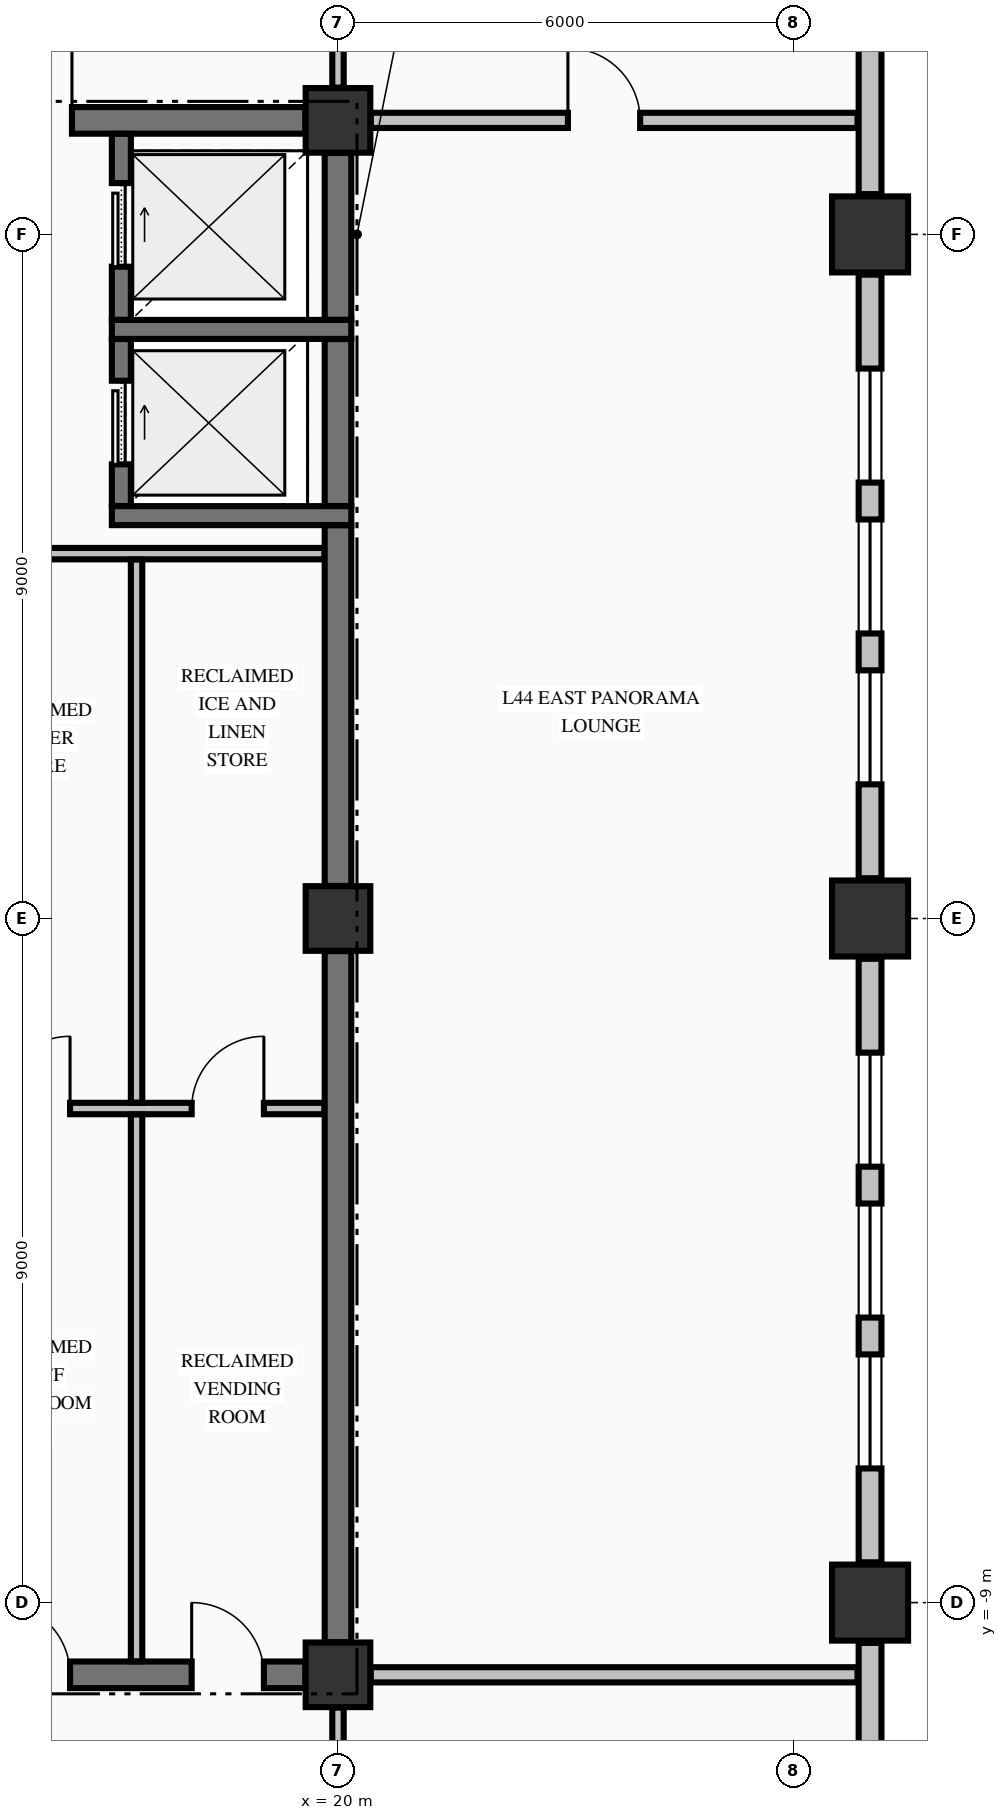
"""IFC4 building model, lengths in metres.
Left out: names, types, materials, properties, quantities, classifications, styles, units other than length and angle.
Written with IfcOpenShell. Run it as: python <this file> out.ifc"""

import sys

from ifc_helpers import new_model, si_unit, direction, frame, frame_2d, origin, origin_2d, place, context, subcontext, project, spatial, rectangle, extrude, element, fill, save


model = new_model("IFC4")
c1 = context("Model", 3, precision=1e-05, world=origin(), true_north=direction((0.0, 1.0)))
c2 = subcontext(c1, "Body", "Model", "MODEL_VIEW")
j1 = project(units=[si_unit("LENGTHUNIT", "METRE"), si_unit("PLANEANGLEUNIT", "RADIAN")], contexts=[c1])
p1 = place(None, origin())
s1 = spatial("IfcSite", under=j1, at=p1, CompositionType="ELEMENT")
p2 = place(p1, origin())
s2 = spatial("IfcBuilding", under=s1, at=p2, CompositionType="ELEMENT")
p3 = place(p2, frame((0.0, 0.0, 172.86)))
s3 = spatial("IfcBuildingStorey", under=s2, at=p3, CompositionType="ELEMENT", Elevation=172.86)
for number, where, z_axis, x_axis in (
    (1, (27.0, -9.0, -0.25), (0.0, 0.0, 1.0), (1.0, 0.0, 0.0)),
    (2, (27.0, 0.0, -0.25), (0.0, 0.0, 1.0), (1.0, 0.0, 0.0)),
    (3, (27.0, 9.0, -0.25), (0.0, 0.0, 1.0), (1.0, 0.0, 0.0)),
):
    element("IfcColumn", number, at=place(p3, frame(where, z_axis=z_axis, x_axis=x_axis)), inside=s3, PredefinedType="COLUMN", context=c2, shape_type="SweptSolid", body=[
        extrude(rectangle(XDim=1.0, YDim=1.0, at=origin_2d()), origin(), (0.0, 0.0, 1.0), 3.375),
    ])
for number, where, z_axis, x_axis in (
    (4, (20.0, -9.95, -0.25), (0.0, 0.0, 1.0), (1.0, 0.0, 0.0)),
    (5, (20.0, 10.5, -0.25), (0.0, 0.0, 1.0), (1.0, 0.0, 0.0)),
    (6, (20.0, 0.0, -0.25), (0.0, 0.0, 1.0), (1.0, 0.0, 0.0)),
):
    element("IfcColumn", number, at=place(p3, frame(where, z_axis=z_axis, x_axis=x_axis)), inside=s3, PredefinedType="COLUMN", context=c2, shape_type="SweptSolid", body=[
        extrude(rectangle(XDim=0.85, YDim=0.85, at=origin_2d()), origin(), (0.0, 0.0, 1.0), 3.375),
    ])
p4 = place(p3, frame((27.0, -18.97, 0.0), z_axis=(0.0, 0.0, 1.0), x_axis=(0.0, 1.0, 0.0)))
e7 = element("IfcWall", 7, at=p4, inside=s3, PredefinedType="STANDARD", context=c2, shape_type="SweptSolid", body=[
    extrude(rectangle(XDim=9.44, YDim=0.3, at=frame_2d((4.72, 0.0))), origin(), (0.0, 0.0, 1.0), 2.517),
])
p5 = place(p3, frame((27.0, -8.47, 0.0), z_axis=(0.0, 0.0, 1.0), x_axis=(0.0, 1.0, 0.0)))
e8 = element("IfcWall", 8, at=p5, inside=s3, PredefinedType="STANDARD", context=c2, shape_type="SweptSolid", body=[
    extrude(rectangle(XDim=7.94, YDim=0.3, at=frame_2d((3.97, 0.0))), origin(), (0.0, 0.0, 1.0), 2.517),
])
p6 = place(p5, frame((1.235, 0.0, 0.72)))
e9 = element("IfcOpeningElement", 9, at=p6, cuts=e8, PredefinedType="OPENING", context=c2, shape_type="SweptSolid", body=[
    extrude(rectangle(XDim=1.5, YDim=1.6, at=frame_2d((0.75, 0.8))), frame((0.0, 0.16, 0.0), z_axis=(0.0, -1.0, 0.0), x_axis=(1.0, 0.0, 0.0)), (0.0, 0.0, 1.0), 0.32),
])
p7 = place(p5, frame((3.22, 0.0, 0.72)))
e10 = element("IfcOpeningElement", 10, at=p7, cuts=e8, PredefinedType="OPENING", context=c2, shape_type="SweptSolid", body=[
    extrude(rectangle(XDim=1.5, YDim=1.6, at=frame_2d((0.75, 0.8))), frame((0.0, 0.16, 0.0), z_axis=(0.0, -1.0, 0.0), x_axis=(1.0, 0.0, 0.0)), (0.0, 0.0, 1.0), 0.32),
])
p8 = place(p5, frame((5.205, 0.0, 0.72)))
e11 = element("IfcOpeningElement", 11, at=p8, cuts=e8, PredefinedType="OPENING", context=c2, shape_type="SweptSolid", body=[
    extrude(rectangle(XDim=1.5, YDim=1.6, at=frame_2d((0.75, 0.8))), frame((0.0, 0.16, 0.0), z_axis=(0.0, -1.0, 0.0), x_axis=(1.0, 0.0, 0.0)), (0.0, 0.0, 1.0), 0.32),
])
p9 = place(p3, frame((27.0, 0.53, 0.0), z_axis=(0.0, 0.0, 1.0), x_axis=(0.0, 1.0, 0.0)))
e12 = element("IfcWall", 12, at=p9, inside=s3, PredefinedType="STANDARD", context=c2, shape_type="SweptSolid", body=[
    extrude(rectangle(XDim=7.94, YDim=0.3, at=frame_2d((3.97, 0.0))), origin(), (0.0, 0.0, 1.0), 2.517),
])
p10 = place(p9, frame((1.235, 0.0, 0.72)))
e13 = element("IfcOpeningElement", 13, at=p10, cuts=e12, PredefinedType="OPENING", context=c2, shape_type="SweptSolid", body=[
    extrude(rectangle(XDim=1.5, YDim=1.6, at=frame_2d((0.75, 0.8))), frame((0.0, 0.16, 0.0), z_axis=(0.0, -1.0, 0.0), x_axis=(1.0, 0.0, 0.0)), (0.0, 0.0, 1.0), 0.32),
])
p11 = place(p9, frame((3.22, 0.0, 0.72)))
e14 = element("IfcOpeningElement", 14, at=p11, cuts=e12, PredefinedType="OPENING", context=c2, shape_type="SweptSolid", body=[
    extrude(rectangle(XDim=1.5, YDim=1.6, at=frame_2d((0.75, 0.8))), frame((0.0, 0.16, 0.0), z_axis=(0.0, -1.0, 0.0), x_axis=(1.0, 0.0, 0.0)), (0.0, 0.0, 1.0), 0.32),
])
p12 = place(p9, frame((5.205, 0.0, 0.72)))
e15 = element("IfcOpeningElement", 15, at=p12, cuts=e12, PredefinedType="OPENING", context=c2, shape_type="SweptSolid", body=[
    extrude(rectangle(XDim=1.5, YDim=1.6, at=frame_2d((0.75, 0.8))), frame((0.0, 0.16, 0.0), z_axis=(0.0, -1.0, 0.0), x_axis=(1.0, 0.0, 0.0)), (0.0, 0.0, 1.0), 0.32),
])
p13 = place(p3, frame((27.0, 9.53, 0.0), z_axis=(0.0, 0.0, 1.0), x_axis=(0.0, 1.0, 0.0)))
e16 = element("IfcWall", 16, at=p13, inside=s3, PredefinedType="STANDARD", context=c2, shape_type="SweptSolid", body=[
    extrude(rectangle(XDim=9.44, YDim=0.3, at=frame_2d((4.72, 0.0))), origin(), (0.0, 0.0, 1.0), 2.517),
])
p14 = place(p3, frame((14.7, -9.95, 0.0), z_axis=(0.0, 0.0, 1.0), x_axis=(1.0, 0.0, 0.0)))
e17 = element("IfcWall", 17, at=p14, inside=s3, PredefinedType="SHEAR", context=c2, shape_type="SweptSolid", body=[
    extrude(rectangle(XDim=4.871, YDim=0.35, at=frame_2d((2.436, 0.0))), origin(), (0.0, 0.0, 1.0), 3.125),
])
p15 = place(p14, frame((0.825, 0.0, 0.0)))
e18 = element("IfcOpeningElement", 18, at=p15, cuts=e17, PredefinedType="OPENING", context=c2, shape_type="SweptSolid", body=[
    extrude(rectangle(XDim=0.95, YDim=2.15, at=frame_2d((0.475, 1.075))), frame((0.0, 0.185, 0.0), z_axis=(0.0, -1.0, 0.0), x_axis=(1.0, 0.0, 0.0)), (0.0, 0.0, 1.0), 0.37),
])
p16 = place(p14, frame((3.375, 0.0, 0.0)))
e19 = element("IfcOpeningElement", 19, at=p16, cuts=e17, PredefinedType="OPENING", context=c2, shape_type="SweptSolid", body=[
    extrude(rectangle(XDim=0.95, YDim=2.15, at=frame_2d((0.475, 1.075))), frame((0.0, 0.185, 0.0), z_axis=(0.0, -1.0, 0.0), x_axis=(1.0, 0.0, 0.0)), (0.0, 0.0, 1.0), 0.37),
])
for number, where, z_axis, x_axis in (
    (20, (17.025, 5.3, 0.0), (0.0, 0.0, 1.0), (1.0, 0.0, 0.0)),
    (21, (17.025, 7.75, 0.0), (0.0, 0.0, 1.0), (1.0, 0.0, 0.0)),
):
    element("IfcWall", number, at=place(p3, frame(where, z_axis=z_axis, x_axis=x_axis)), inside=s3, PredefinedType="SOLIDWALL", context=c2, shape_type="SweptSolid", body=[
        extrude(rectangle(XDim=3.15, YDim=0.25, at=frame_2d((1.575, 0.0))), origin(), (0.0, 0.0, 1.0), 3.125),
    ])
p17 = place(p3, frame((14.7, 10.5, 0.0), z_axis=(0.0, 0.0, 1.0), x_axis=(1.0, 0.0, 0.0)))
e22 = element("IfcWall", 22, at=p17, inside=s3, PredefinedType="SHEAR", context=c2, shape_type="SweptSolid", body=[
    extrude(rectangle(XDim=4.871, YDim=0.35, at=frame_2d((2.436, 0.0))), origin(), (0.0, 0.0, 1.0), 3.125),
])
p18 = place(p17, frame((0.7, 0.0, 0.0)))
e23 = element("IfcOpeningElement", 23, at=p18, cuts=e22, PredefinedType="OPENING", context=c2, shape_type="SweptSolid", body=[
    extrude(rectangle(XDim=1.1, YDim=2.15, at=frame_2d((0.55, 1.075))), frame((0.0, 0.185, 0.0), z_axis=(0.0, -1.0, 0.0), x_axis=(1.0, 0.0, 0.0)), (0.0, 0.0, 1.0), 0.37),
])
p19 = place(p3, frame((20.431, -9.95, 0.0), z_axis=(0.0, 0.0, 1.0), x_axis=(1.0, 0.0, 0.0)))
e24 = element("IfcWall", 24, at=p19, inside=s3, PredefinedType="PARTITIONING", context=c2, shape_type="SweptSolid", body=[
    extrude(rectangle(XDim=6.404, YDim=0.2, at=frame_2d((3.202, 0.0))), origin(), (0.0, 0.0, 1.0), 3.125),
])
p20 = place(p3, frame((14.878, -2.5, 0.0), z_axis=(0.0, 0.0, 1.0), x_axis=(1.0, 0.0, 0.0)))
e25 = element("IfcWall", 25, at=p20, inside=s3, PredefinedType="PARTITIONING", context=c2, shape_type="SweptSolid", body=[
    extrude(rectangle(XDim=4.944, YDim=0.15, at=frame_2d((2.472, 0.0))), origin(), (0.0, 0.0, 1.0), 3.125),
])
p21 = place(p20, frame((0.647, 0.0, 0.0)))
e26 = element("IfcOpeningElement", 26, at=p21, cuts=e25, PredefinedType="OPENING", context=c2, shape_type="SweptSolid", body=[
    extrude(rectangle(XDim=0.95, YDim=2.15, at=frame_2d((0.475, 1.075))), frame((0.0, 0.085, 0.0), z_axis=(0.0, -1.0, 0.0), x_axis=(1.0, 0.0, 0.0)), (0.0, 0.0, 1.0), 0.17),
])
p22 = place(p20, frame((3.197, 0.0, 0.0)))
e27 = element("IfcOpeningElement", 27, at=p22, cuts=e25, PredefinedType="OPENING", context=c2, shape_type="SweptSolid", body=[
    extrude(rectangle(XDim=0.95, YDim=2.15, at=frame_2d((0.475, 1.075))), frame((0.0, 0.085, 0.0), z_axis=(0.0, -1.0, 0.0), x_axis=(1.0, 0.0, 0.0)), (0.0, 0.0, 1.0), 0.17),
])
p23 = place(p3, frame((14.878, 4.8, 0.0), z_axis=(0.0, 0.0, 1.0), x_axis=(1.0, 0.0, 0.0)))
e28 = element("IfcWall", 28, at=p23, inside=s3, PredefinedType="PARTITIONING", context=c2, shape_type="SweptSolid", body=[
    extrude(rectangle(XDim=4.944, YDim=0.15, at=frame_2d((2.472, 0.0))), origin(), (0.0, 0.0, 1.0), 3.125),
])
p24 = place(p3, frame((20.431, 10.5, 0.0), z_axis=(0.0, 0.0, 1.0), x_axis=(1.0, 0.0, 0.0)))
e29 = element("IfcWall", 29, at=p24, inside=s3, PredefinedType="PARTITIONING", context=c2, shape_type="SweptSolid", body=[
    extrude(rectangle(XDim=6.404, YDim=0.2, at=frame_2d((3.202, 0.0))), origin(), (0.0, 0.0, 1.0), 3.125),
])
p25 = place(p24, frame((2.594, 0.0, 0.0)))
e30 = element("IfcOpeningElement", 30, at=p25, cuts=e29, PredefinedType="OPENING", context=c2, shape_type="SweptSolid", body=[
    extrude(rectangle(XDim=0.95, YDim=2.15, at=frame_2d((0.475, 1.075))), frame((0.0, 0.11, 0.0), z_axis=(0.0, -1.0, 0.0), x_axis=(1.0, 0.0, 0.0)), (0.0, 0.0, 1.0), 0.22),
])
p26 = place(p3, frame((17.15, 5.427, 0.0), z_axis=(0.0, 0.0, 1.0), x_axis=(0.0, 1.0, 0.0)))
e31 = element("IfcWall", 31, at=p26, inside=s3, PredefinedType="SOLIDWALL", context=c2, shape_type="SweptSolid", body=[
    extrude(rectangle(XDim=2.196, YDim=0.25, at=frame_2d((1.098, 0.0))), origin(), (0.0, 0.0, 1.0), 3.125),
])
p27 = place(p26, frame((0.548, 0.0, 0.0)))
e32 = element("IfcOpeningElement", 32, at=p27, cuts=e31, PredefinedType="OPENING", context=c2, shape_type="SweptSolid", body=[
    extrude(rectangle(XDim=1.1, YDim=2.2, at=frame_2d((0.55, 1.1))), frame((0.0, 0.135, 0.0), z_axis=(0.0, -1.0, 0.0), x_axis=(1.0, 0.0, 0.0)), (0.0, 0.0, 1.0), 0.27),
])
p28 = place(p3, frame((17.15, 7.877, 0.0), z_axis=(0.0, 0.0, 1.0), x_axis=(0.0, 1.0, 0.0)))
e33 = element("IfcWall", 33, at=p28, inside=s3, PredefinedType="SOLIDWALL", context=c2, shape_type="SweptSolid", body=[
    extrude(rectangle(XDim=2.446, YDim=0.25, at=frame_2d((1.223, 0.0))), origin(), (0.0, 0.0, 1.0), 3.125),
])
p29 = place(p28, frame((0.698, 0.0, 0.0)))
e34 = element("IfcOpeningElement", 34, at=p29, cuts=e33, PredefinedType="OPENING", context=c2, shape_type="SweptSolid", body=[
    extrude(rectangle(XDim=1.1, YDim=2.2, at=frame_2d((0.55, 1.1))), frame((0.0, 0.135, 0.0), z_axis=(0.0, -1.0, 0.0), x_axis=(1.0, 0.0, 0.0)), (0.0, 0.0, 1.0), 0.27),
])
p30 = place(p3, frame((20.0, -9.521, 0.0), z_axis=(0.0, 0.0, 1.0), x_axis=(0.0, 1.0, 0.0)))
e35 = element("IfcWall", 35, at=p30, inside=s3, PredefinedType="SHEAR", context=c2, shape_type="SweptSolid", body=[
    extrude(rectangle(XDim=9.092, YDim=0.35, at=frame_2d((4.546, 0.0))), origin(), (0.0, 0.0, 1.0), 3.125),
])
p31 = place(p3, frame((20.0, 0.429, 0.0), z_axis=(0.0, 0.0, 1.0), x_axis=(0.0, 1.0, 0.0)))
e36 = element("IfcWall", 36, at=p31, inside=s3, PredefinedType="SHEAR", context=c2, shape_type="SweptSolid", body=[
    extrude(rectangle(XDim=4.744, YDim=0.35, at=frame_2d((2.372, 0.0))), origin(), (0.0, 0.0, 1.0), 3.125),
])
p32 = place(p3, frame((20.0, 5.427, 0.0), z_axis=(0.0, 0.0, 1.0), x_axis=(0.0, 1.0, 0.0)))
e37 = element("IfcWall", 37, at=p32, inside=s3, PredefinedType="SHEAR", context=c2, shape_type="SweptSolid", body=[
    extrude(rectangle(XDim=2.196, YDim=0.35, at=frame_2d((1.098, 0.0))), origin(), (0.0, 0.0, 1.0), 3.125),
])
p33 = place(p3, frame((20.0, 7.877, 0.0), z_axis=(0.0, 0.0, 1.0), x_axis=(0.0, 1.0, 0.0)))
e38 = element("IfcWall", 38, at=p33, inside=s3, PredefinedType="SHEAR", context=c2, shape_type="SweptSolid", body=[
    extrude(rectangle(XDim=2.194, YDim=0.35, at=frame_2d((1.097, 0.0))), origin(), (0.0, 0.0, 1.0), 3.125),
])
p34 = place(p3, frame((17.35, -9.772, 0.0), z_axis=(0.0, 0.0, 1.0), x_axis=(0.0, 1.0, 0.0)))
e39 = element("IfcWall", 39, at=p34, inside=s3, PredefinedType="PARTITIONING", context=c2, shape_type="SweptSolid", body=[
    extrude(rectangle(XDim=7.194, YDim=0.15, at=frame_2d((3.597, 0.0))), origin(), (0.0, 0.0, 1.0), 3.125),
])
p35 = place(p3, frame((17.35, -2.422, 0.0), z_axis=(0.0, 0.0, 1.0), x_axis=(0.0, 1.0, 0.0)))
e40 = element("IfcWall", 40, at=p35, inside=s3, PredefinedType="PARTITIONING", context=c2, shape_type="SweptSolid", body=[
    extrude(rectangle(XDim=7.144, YDim=0.15, at=frame_2d((3.572, 0.0))), origin(), (0.0, 0.0, 1.0), 3.125),
])
p36 = place(p3, frame((20.0, -12.097, 0.0), z_axis=(0.0, 0.0, 1.0), x_axis=(0.0, 1.0, 0.0)))
e41 = element("IfcWall", 41, at=p36, inside=s3, PredefinedType="PARTITIONING", context=c2, shape_type="SweptSolid", body=[
    extrude(rectangle(XDim=1.716, YDim=0.15, at=frame_2d((0.858, 0.0))), origin(), (0.0, 0.0, 1.0), 2.317),
])
p37 = place(p3, frame((20.0, 10.931, 0.0), z_axis=(0.0, 0.0, 1.0), x_axis=(0.0, 1.0, 0.0)))
e42 = element("IfcWall", 42, at=p37, inside=s3, PredefinedType="PARTITIONING", context=c2, shape_type="SweptSolid", body=[
    extrude(rectangle(XDim=2.516, YDim=0.15, at=frame_2d((1.258, 0.0))), origin(), (0.0, 0.0, 1.0), 2.317),
])
p38 = place(p37, frame((0.624, 0.0, 0.0)))
e43 = element("IfcOpeningElement", 43, at=p38, cuts=e42, PredefinedType="OPENING", context=c2, shape_type="SweptSolid", body=[
    extrude(rectangle(XDim=0.95, YDim=2.15, at=frame_2d((0.475, 1.075))), frame((0.0, 0.085, 0.0), z_axis=(0.0, -1.0, 0.0), x_axis=(1.0, 0.0, 0.0)), (0.0, 0.0, 1.0), 0.17),
])
p39 = place(p6, origin())
e44 = element("IfcWindow", 44, at=p39, inside=s3, PartitioningType="SINGLE_PANEL", PredefinedType="WINDOW", context=c2, shape_type="SweptSolid", body=[
    extrude(rectangle(XDim=1.5, YDim=1.6, at=frame_2d((0.75, 0.8))), frame((0.0, 0.03, 0.0), z_axis=(0.0, -1.0, 0.0), x_axis=(1.0, 0.0, 0.0)), (0.0, 0.0, 1.0), 0.06),
])
fill(e9, e44)
p40 = place(p7, origin())
e45 = element("IfcWindow", 45, at=p40, inside=s3, PartitioningType="SINGLE_PANEL", PredefinedType="WINDOW", context=c2, shape_type="SweptSolid", body=[
    extrude(rectangle(XDim=1.5, YDim=1.6, at=frame_2d((0.75, 0.8))), frame((0.0, 0.03, 0.0), z_axis=(0.0, -1.0, 0.0), x_axis=(1.0, 0.0, 0.0)), (0.0, 0.0, 1.0), 0.06),
])
fill(e10, e45)
p41 = place(p8, origin())
e46 = element("IfcWindow", 46, at=p41, inside=s3, PartitioningType="SINGLE_PANEL", PredefinedType="WINDOW", context=c2, shape_type="SweptSolid", body=[
    extrude(rectangle(XDim=1.5, YDim=1.6, at=frame_2d((0.75, 0.8))), frame((0.0, 0.03, 0.0), z_axis=(0.0, -1.0, 0.0), x_axis=(1.0, 0.0, 0.0)), (0.0, 0.0, 1.0), 0.06),
])
fill(e11, e46)
p42 = place(p10, origin())
e47 = element("IfcWindow", 47, at=p42, inside=s3, PartitioningType="SINGLE_PANEL", PredefinedType="WINDOW", context=c2, shape_type="SweptSolid", body=[
    extrude(rectangle(XDim=1.5, YDim=1.6, at=frame_2d((0.75, 0.8))), frame((0.0, 0.03, 0.0), z_axis=(0.0, -1.0, 0.0), x_axis=(1.0, 0.0, 0.0)), (0.0, 0.0, 1.0), 0.06),
])
fill(e13, e47)
p43 = place(p11, origin())
e48 = element("IfcWindow", 48, at=p43, inside=s3, PartitioningType="SINGLE_PANEL", PredefinedType="WINDOW", context=c2, shape_type="SweptSolid", body=[
    extrude(rectangle(XDim=1.5, YDim=1.6, at=frame_2d((0.75, 0.8))), frame((0.0, 0.03, 0.0), z_axis=(0.0, -1.0, 0.0), x_axis=(1.0, 0.0, 0.0)), (0.0, 0.0, 1.0), 0.06),
])
fill(e14, e48)
p44 = place(p12, origin())
e49 = element("IfcWindow", 49, at=p44, inside=s3, PartitioningType="SINGLE_PANEL", PredefinedType="WINDOW", context=c2, shape_type="SweptSolid", body=[
    extrude(rectangle(XDim=1.5, YDim=1.6, at=frame_2d((0.75, 0.8))), frame((0.0, 0.03, 0.0), z_axis=(0.0, -1.0, 0.0), x_axis=(1.0, 0.0, 0.0)), (0.0, 0.0, 1.0), 0.06),
])
fill(e15, e49)
p45 = place(p27, origin())
e50 = element("IfcDoor", 50, at=p45, inside=s3, OperationType="SLIDING_TO_RIGHT", PredefinedType="DOOR", context=c2, shape_type="SweptSolid", body=[
    extrude(rectangle(XDim=1.1, YDim=2.2, at=frame_2d((0.55, 1.1))), frame((0.0, 0.025, 0.0), z_axis=(0.0, -1.0, 0.0), x_axis=(1.0, 0.0, 0.0)), (0.0, 0.0, 1.0), 0.05),
])
fill(e32, e50)
p46 = place(p29, origin())
e51 = element("IfcDoor", 51, at=p46, inside=s3, OperationType="SLIDING_TO_RIGHT", PredefinedType="DOOR", context=c2, shape_type="SweptSolid", body=[
    extrude(rectangle(XDim=1.1, YDim=2.2, at=frame_2d((0.55, 1.1))), frame((0.0, 0.025, 0.0), z_axis=(0.0, -1.0, 0.0), x_axis=(1.0, 0.0, 0.0)), (0.0, 0.0, 1.0), 0.05),
])
fill(e34, e51)
p47 = place(p18, origin())
e52 = element("IfcDoor", 52, at=p47, inside=s3, OperationType="SINGLE_SWING_RIGHT", PredefinedType="DOOR", context=c2, shape_type="SweptSolid", body=[
    extrude(rectangle(XDim=1.1, YDim=2.15, at=frame_2d((0.55, 1.075))), frame((0.0, 0.025, 0.0), z_axis=(0.0, -1.0, 0.0), x_axis=(1.0, 0.0, 0.0)), (0.0, 0.0, 1.0), 0.05),
])
fill(e23, e52)
p48 = place(p15, origin())
e53 = element("IfcDoor", 53, at=p48, inside=s3, OperationType="SINGLE_SWING_LEFT", PredefinedType="DOOR", context=c2, shape_type="SweptSolid", body=[
    extrude(rectangle(XDim=0.95, YDim=2.15, at=frame_2d((0.475, 1.075))), frame((0.0, 0.025, 0.0), z_axis=(0.0, -1.0, 0.0), x_axis=(1.0, 0.0, 0.0)), (0.0, 0.0, 1.0), 0.05),
])
fill(e18, e53)
p49 = place(p21, origin())
e54 = element("IfcDoor", 54, at=p49, inside=s3, OperationType="SINGLE_SWING_RIGHT", PredefinedType="DOOR", context=c2, shape_type="SweptSolid", body=[
    extrude(rectangle(XDim=0.95, YDim=2.15, at=frame_2d((0.475, 1.075))), frame((0.0, 0.025, 0.0), z_axis=(0.0, -1.0, 0.0), x_axis=(1.0, 0.0, 0.0)), (0.0, 0.0, 1.0), 0.05),
])
fill(e26, e54)
p50 = place(p16, origin())
e55 = element("IfcDoor", 55, at=p50, inside=s3, OperationType="SINGLE_SWING_LEFT", PredefinedType="DOOR", context=c2, shape_type="SweptSolid", body=[
    extrude(rectangle(XDim=0.95, YDim=2.15, at=frame_2d((0.475, 1.075))), frame((0.0, 0.025, 0.0), z_axis=(0.0, -1.0, 0.0), x_axis=(1.0, 0.0, 0.0)), (0.0, 0.0, 1.0), 0.05),
])
fill(e19, e55)
p51 = place(p22, origin())
e56 = element("IfcDoor", 56, at=p51, inside=s3, OperationType="SINGLE_SWING_RIGHT", PredefinedType="DOOR", context=c2, shape_type="SweptSolid", body=[
    extrude(rectangle(XDim=0.95, YDim=2.15, at=frame_2d((0.475, 1.075))), frame((0.0, 0.025, 0.0), z_axis=(0.0, -1.0, 0.0), x_axis=(1.0, 0.0, 0.0)), (0.0, 0.0, 1.0), 0.05),
])
fill(e27, e56)
p52 = place(p25, origin())
e57 = element("IfcDoor", 57, at=p52, inside=s3, OperationType="SINGLE_SWING_LEFT", PredefinedType="DOOR", context=c2, shape_type="SweptSolid", body=[
    extrude(rectangle(XDim=0.95, YDim=2.15, at=frame_2d((0.475, 1.075))), frame((0.0, 0.025, 0.0), z_axis=(0.0, -1.0, 0.0), x_axis=(1.0, 0.0, 0.0)), (0.0, 0.0, 1.0), 0.05),
])
fill(e30, e57)
save(model, sys.argv[1])
